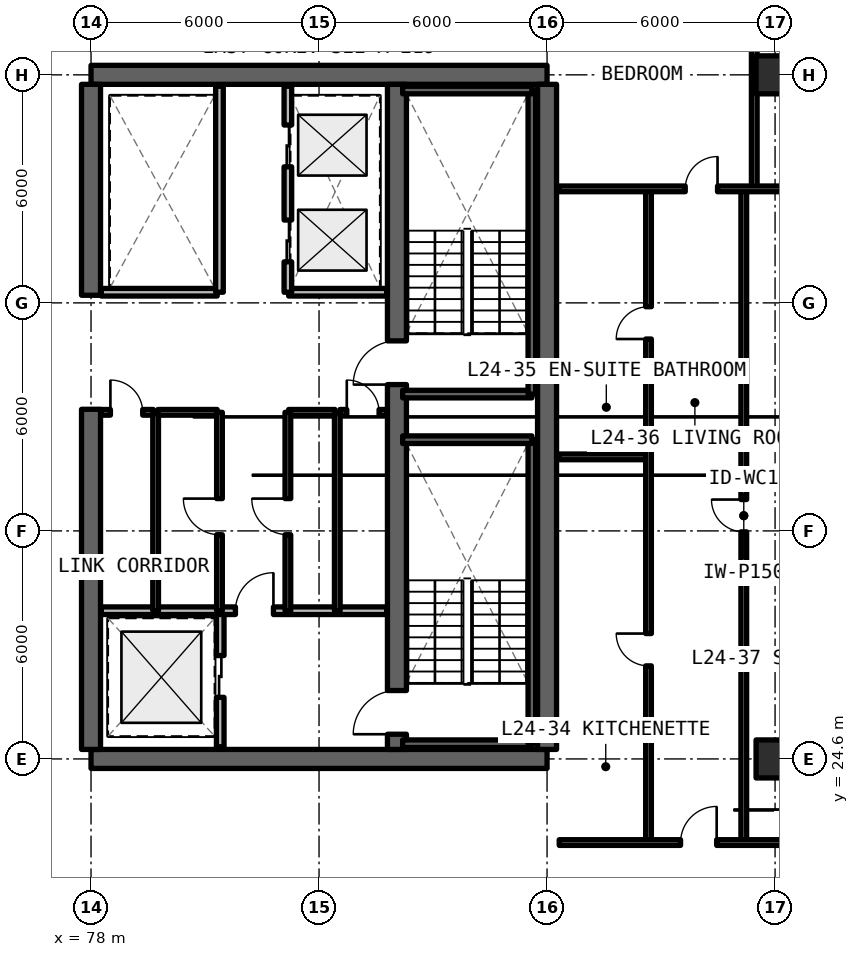
"""IFC4 building model, lengths in metres.
Left out: names, types, materials, properties, quantities, classifications, styles, units other than length and angle.
Written with IfcOpenShell. Run it as: python <this file> out.ifc"""

import sys

from ifc_helpers import new_model, si_unit, direction, frame, frame_2d, origin, origin_2d, place, context, subcontext, project, spatial, rectangle, extrude, element, fill, save


model = new_model("IFC4")
c1 = context("Model", 3, precision=1e-05, world=origin(), true_north=direction((0.0, 1.0)))
c2 = subcontext(c1, "Body", "Model", "MODEL_VIEW")
j1 = project(units=[si_unit("LENGTHUNIT", "METRE"), si_unit("PLANEANGLEUNIT", "RADIAN")], contexts=[c1])
p1 = place(None, origin())
s1 = spatial("IfcSite", under=j1, at=p1, CompositionType="ELEMENT")
p2 = place(p1, origin())
s2 = spatial("IfcBuilding", under=s1, at=p2, CompositionType="ELEMENT")
p3 = place(p2, frame((0.0, 0.0, 88.77)))
s3 = spatial("IfcBuildingStorey", under=s2, at=p3, CompositionType="ELEMENT", Elevation=88.77)
for number, where, z_axis, x_axis in (
    (1, (78.0, 24.6, 0.0), (0.0, 0.0, 1.0), (1.0, 0.0, 0.0)),
    (2, (90.0, 42.6, 0.0), (0.0, 0.0, 1.0), (-1.0, 0.0, 0.0)),
):
    element("IfcWall", number, at=place(p3, frame(where, z_axis=z_axis, x_axis=x_axis)), inside=s3, PredefinedType="SHEAR", context=c2, shape_type="SweptSolid", body=[
        extrude(rectangle(XDim=12.0, YDim=0.5, at=frame_2d((6.0, 0.0))), origin(), (0.0, 0.0, 1.0), 3.3),
    ])
p4 = place(p3, frame((90.0, 24.85, 0.0), z_axis=(0.0, 0.0, 1.0), x_axis=(0.0, 1.0, 0.0)))
e3 = element("IfcWall", 3, at=p4, inside=s3, PredefinedType="SHEAR", context=c2, shape_type="SweptSolid", body=[
    extrude(rectangle(XDim=17.5, YDim=0.5, at=frame_2d((8.75, 0.0))), origin(), (0.0, 0.0, 1.0), 3.3),
])
p5 = place(p3, frame((78.0, 24.85, 0.0), z_axis=(0.0, 0.0, 1.0), x_axis=(0.0, 1.0, 0.0)))
e4 = element("IfcWall", 4, at=p5, inside=s3, PredefinedType="SHEAR", context=c2, shape_type="SweptSolid", body=[
    extrude(rectangle(XDim=8.95, YDim=0.5, at=frame_2d((4.475, 0.0))), origin(), (0.0, 0.0, 1.0), 3.3),
])
p6 = place(p3, frame((78.0, 36.8, 0.0), z_axis=(0.0, 0.0, 1.0), x_axis=(0.0, 1.0, 0.0)))
e5 = element("IfcWall", 5, at=p6, inside=s3, PredefinedType="SHEAR", context=c2, shape_type="SweptSolid", body=[
    extrude(rectangle(XDim=5.55, YDim=0.5, at=frame_2d((2.775, 0.0))), origin(), (0.0, 0.0, 1.0), 3.3),
])
p7 = place(p3, frame((86.05, 24.85, 0.0), z_axis=(0.0, 0.0, 1.0), x_axis=(0.0, 1.0, 0.0)))
e6 = element("IfcWall", 6, at=p7, inside=s3, PredefinedType="SHEAR", context=c2, shape_type="SweptSolid", body=[
    extrude(rectangle(XDim=17.5, YDim=0.5, at=frame_2d((8.75, 0.0))), origin(), (0.0, 0.0, 1.0), 3.3),
])
p8 = place(p7, frame((0.4, 0.0, 0.0)))
e7 = element("IfcOpeningElement", 7, at=p8, cuts=e6, PredefinedType="OPENING", context=c2, shape_type="SweptSolid", body=[
    extrude(rectangle(XDim=1.15, YDim=2.15, at=frame_2d((0.575, 1.075))), frame((0.0, 0.26, 0.0), z_axis=(0.0, -1.0, 0.0), x_axis=(1.0, 0.0, 0.0)), (0.0, 0.0, 1.0), 0.52),
])
p9 = place(p7, frame((9.6, 0.0, 0.0)))
e8 = element("IfcOpeningElement", 8, at=p9, cuts=e6, PredefinedType="OPENING", context=c2, shape_type="SweptSolid", body=[
    extrude(rectangle(XDim=1.15, YDim=2.15, at=frame_2d((0.575, 1.075))), frame((0.0, 0.26, 0.0), z_axis=(0.0, -1.0, 0.0), x_axis=(1.0, 0.0, 0.0)), (0.0, 0.0, 1.0), 0.52),
])
for number, where, z_axis, x_axis in (
    (9, (96.0, 24.6, 0.0), (0.0, 0.0, 1.0), (1.0, 0.0, 0.0)),
    (10, (96.0, 42.6, 0.0), (0.0, 0.0, 1.0), (1.0, 0.0, 0.0)),
):
    element("IfcColumn", number, at=place(p3, frame(where, z_axis=z_axis, x_axis=x_axis)), inside=s3, PredefinedType="COLUMN", context=c2, shape_type="SweptSolid", body=[
        extrude(rectangle(XDim=1.0, YDim=1.0, at=origin_2d()), origin(), (0.0, 0.0, 1.0), 3.3),
    ])
p10 = place(p3, frame((81.4, 24.92, 0.0), z_axis=(0.0, 0.0, 1.0), x_axis=(0.0, 1.0, 0.0)))
e11 = element("IfcWall", 11, at=p10, inside=s3, PredefinedType="SOLIDWALL", context=c2, shape_type="SweptSolid", body=[
    extrude(rectangle(XDim=3.58, YDim=0.2, at=frame_2d((1.79, 0.0))), origin(), (0.0, 0.0, 1.0), 2.35),
])
p11 = place(p10, frame((1.3, 0.0, 0.0)))
e12 = element("IfcOpeningElement", 12, at=p11, cuts=e11, PredefinedType="OPENING", context=c2, shape_type="SweptSolid", body=[
    extrude(rectangle(XDim=1.1, YDim=2.2, at=frame_2d((0.55, 1.1))), frame((0.0, 0.11, 0.0), z_axis=(0.0, -1.0, 0.0), x_axis=(1.0, 0.0, 0.0)), (0.0, 0.0, 1.0), 0.22),
])
p12 = place(p3, frame((78.27, 28.5, 0.0), z_axis=(0.0, 0.0, 1.0), x_axis=(1.0, 0.0, 0.0)))
e13 = element("IfcWall", 13, at=p12, inside=s3, PredefinedType="SOLIDWALL", context=c2, shape_type="SweptSolid", body=[
    extrude(rectangle(XDim=7.51, YDim=0.2, at=frame_2d((3.755, 0.0))), origin(), (0.0, 0.0, 1.0), 2.35),
])
p13 = place(p12, frame((3.53, 0.0, 0.0)))
e14 = element("IfcOpeningElement", 14, at=p13, cuts=e13, PredefinedType="OPENING", context=c2, shape_type="SweptSolid", body=[
    extrude(rectangle(XDim=1.0, YDim=2.15, at=frame_2d((0.5, 1.075))), frame((0.0, 0.11, 0.0), z_axis=(0.0, -1.0, 0.0), x_axis=(1.0, 0.0, 0.0)), (0.0, 0.0, 1.0), 0.22),
])
p14 = place(p3, frame((84.48, 28.5, 0.0), z_axis=(0.0, 0.0, 1.0), x_axis=(0.0, 1.0, 0.0)))
e15 = element("IfcWall", 15, at=p14, inside=s3, PredefinedType="SOLIDWALL", context=c2, shape_type="SweptSolid", body=[
    extrude(rectangle(XDim=5.22, YDim=0.15, at=frame_2d((2.61, 0.0))), origin(), (0.0, 0.0, 1.0), 2.35),
])
p15 = place(p3, frame((84.55, 33.72, 0.0), z_axis=(0.0, 0.0, 1.0), x_axis=(1.0, 0.0, 0.0)))
e16 = element("IfcWall", 16, at=p15, inside=s3, PredefinedType="SOLIDWALL", context=c2, shape_type="SweptSolid", body=[
    extrude(rectangle(XDim=1.23, YDim=0.15, at=frame_2d((0.615, 0.0))), origin(), (0.0, 0.0, 1.0), 2.35),
])
p16 = place(p15, frame((0.18, 0.0, 0.0)))
e17 = element("IfcOpeningElement", 17, at=p16, cuts=e16, PredefinedType="OPENING", context=c2, shape_type="SweptSolid", body=[
    extrude(rectangle(XDim=0.85, YDim=2.1, at=frame_2d((0.425, 1.05))), frame((0.0, 0.085, 0.0), z_axis=(0.0, -1.0, 0.0), x_axis=(1.0, 0.0, 0.0)), (0.0, 0.0, 1.0), 0.17),
])
p17 = place(p3, frame((83.2, 33.72, 0.0), z_axis=(0.0, 0.0, 1.0), x_axis=(1.0, 0.0, 0.0)))
e18 = element("IfcWall", 18, at=p17, inside=s3, PredefinedType="SOLIDWALL", context=c2, shape_type="SweptSolid", body=[
    extrude(rectangle(XDim=1.22, YDim=0.15, at=frame_2d((0.61, 0.0))), origin(), (0.0, 0.0, 1.0), 2.35),
])
p18 = place(p3, frame((83.18, 28.5, 0.0), z_axis=(0.0, 0.0, 1.0), x_axis=(0.0, 1.0, 0.0)))
e19 = element("IfcWall", 19, at=p18, inside=s3, PredefinedType="SOLIDWALL", context=c2, shape_type="SweptSolid", body=[
    extrude(rectangle(XDim=5.22, YDim=0.15, at=frame_2d((2.61, 0.0))), origin(), (0.0, 0.0, 1.0), 2.35),
])
p19 = place(p18, frame((2.0, 0.0, 0.0)))
e20 = element("IfcOpeningElement", 20, at=p19, cuts=e19, PredefinedType="OPENING", context=c2, shape_type="SweptSolid", body=[
    extrude(rectangle(XDim=0.95, YDim=2.15, at=frame_2d((0.475, 1.075))), frame((0.0, 0.085, 0.0), z_axis=(0.0, -1.0, 0.0), x_axis=(1.0, 0.0, 0.0)), (0.0, 0.0, 1.0), 0.17),
])
p20 = place(p3, frame((79.7, 28.5, 0.0), z_axis=(0.0, 0.0, 1.0), x_axis=(0.0, 1.0, 0.0)))
e21 = element("IfcWall", 21, at=p20, inside=s3, PredefinedType="SOLIDWALL", context=c2, shape_type="SweptSolid", body=[
    extrude(rectangle(XDim=5.22, YDim=0.15, at=frame_2d((2.61, 0.0))), origin(), (0.0, 0.0, 1.0), 2.35),
])
p21 = place(p3, frame((79.76, 33.72, 0.0), z_axis=(0.0, 0.0, 1.0), x_axis=(1.0, 0.0, 0.0)))
e22 = element("IfcWall", 22, at=p21, inside=s3, PredefinedType="SOLIDWALL", context=c2, shape_type="SweptSolid", body=[
    extrude(rectangle(XDim=1.56, YDim=0.15, at=frame_2d((0.78, 0.0))), origin(), (0.0, 0.0, 1.0), 2.35),
])
p22 = place(p3, frame((78.27, 33.72, 0.0), z_axis=(0.0, 0.0, 1.0), x_axis=(1.0, 0.0, 0.0)))
e23 = element("IfcWall", 23, at=p22, inside=s3, PredefinedType="SOLIDWALL", context=c2, shape_type="SweptSolid", body=[
    extrude(rectangle(XDim=1.37, YDim=0.15, at=frame_2d((0.685, 0.0))), origin(), (0.0, 0.0, 1.0), 2.35),
])
p23 = place(p22, frame((0.24, 0.0, 0.0)))
e24 = element("IfcOpeningElement", 24, at=p23, cuts=e23, PredefinedType="OPENING", context=c2, shape_type="SweptSolid", body=[
    extrude(rectangle(XDim=0.85, YDim=2.1, at=frame_2d((0.425, 1.05))), frame((0.0, 0.085, 0.0), z_axis=(0.0, -1.0, 0.0), x_axis=(1.0, 0.0, 0.0)), (0.0, 0.0, 1.0), 0.17),
])
p24 = place(p3, frame((81.38, 28.5, 0.0), z_axis=(0.0, 0.0, 1.0), x_axis=(0.0, 1.0, 0.0)))
e25 = element("IfcWall", 25, at=p24, inside=s3, PredefinedType="SOLIDWALL", context=c2, shape_type="SweptSolid", body=[
    extrude(rectangle(XDim=5.22, YDim=0.15, at=frame_2d((2.61, 0.0))), origin(), (0.0, 0.0, 1.0), 2.35),
])
p25 = place(p24, frame((2.0, 0.0, 0.0)))
e26 = element("IfcOpeningElement", 26, at=p25, cuts=e25, PredefinedType="OPENING", context=c2, shape_type="SweptSolid", body=[
    extrude(rectangle(XDim=0.95, YDim=2.15, at=frame_2d((0.475, 1.075))), frame((0.0, 0.085, 0.0), z_axis=(0.0, -1.0, 0.0), x_axis=(1.0, 0.0, 0.0)), (0.0, 0.0, 1.0), 0.17),
])
p26 = place(p3, frame((83.2, 36.88, 0.0), z_axis=(0.0, 0.0, 1.0), x_axis=(1.0, 0.0, 0.0)))
e27 = element("IfcWall", 27, at=p26, inside=s3, PredefinedType="SOLIDWALL", context=c2, shape_type="SweptSolid", body=[
    extrude(rectangle(XDim=2.58, YDim=0.2, at=frame_2d((1.29, 0.0))), origin(), (0.0, 0.0, 1.0), 2.35),
])
p27 = place(p3, frame((83.18, 36.88, 0.0), z_axis=(0.0, 0.0, 1.0), x_axis=(0.0, 1.0, 0.0)))
e28 = element("IfcWall", 28, at=p27, inside=s3, PredefinedType="SOLIDWALL", context=c2, shape_type="SweptSolid", body=[
    extrude(rectangle(XDim=5.42, YDim=0.2, at=frame_2d((2.71, 0.0))), origin(), (0.0, 0.0, 1.0), 2.35),
])
p28 = place(p27, frame((0.8, 0.0, 0.0)))
e29 = element("IfcOpeningElement", 29, at=p28, cuts=e28, PredefinedType="OPENING", context=c2, shape_type="SweptSolid", body=[
    extrude(rectangle(XDim=1.1, YDim=2.2, at=frame_2d((0.55, 1.1))), frame((0.0, 0.11, 0.0), z_axis=(0.0, -1.0, 0.0), x_axis=(1.0, 0.0, 0.0)), (0.0, 0.0, 1.0), 0.22),
])
p29 = place(p27, frame((3.3, 0.0, 0.0)))
e30 = element("IfcOpeningElement", 30, at=p29, cuts=e28, PredefinedType="OPENING", context=c2, shape_type="SweptSolid", body=[
    extrude(rectangle(XDim=1.1, YDim=2.2, at=frame_2d((0.55, 1.1))), frame((0.0, 0.11, 0.0), z_axis=(0.0, -1.0, 0.0), x_axis=(1.0, 0.0, 0.0)), (0.0, 0.0, 1.0), 0.22),
])
p30 = place(p3, frame((78.27, 36.88, 0.0), z_axis=(0.0, 0.0, 1.0), x_axis=(1.0, 0.0, 0.0)))
e31 = element("IfcWall", 31, at=p30, inside=s3, PredefinedType="SOLIDWALL", context=c2, shape_type="SweptSolid", body=[
    extrude(rectangle(XDim=3.05, YDim=0.2, at=frame_2d((1.525, 0.0))), origin(), (0.0, 0.0, 1.0), 2.35),
])
p31 = place(p3, frame((81.38, 36.88, 0.0), z_axis=(0.0, 0.0, 1.0), x_axis=(0.0, 1.0, 0.0)))
e32 = element("IfcWall", 32, at=p31, inside=s3, PredefinedType="SOLIDWALL", context=c2, shape_type="SweptSolid", body=[
    extrude(rectangle(XDim=5.42, YDim=0.2, at=frame_2d((2.71, 0.0))), origin(), (0.0, 0.0, 1.0), 2.35),
])
p32 = place(p3, frame((95.177, 22.4, 0.0), z_axis=(0.0, 0.0, 1.0), x_axis=(0.0, 1.0, 0.0)))
e33 = element("IfcWall", 33, at=p32, inside=s3, PredefinedType="PARTITIONING", context=c2, shape_type="SweptSolid", body=[
    extrude(rectangle(XDim=17.2, YDim=0.15, at=frame_2d((8.6, 0.0))), origin(), (0.0, 0.0, 1.0), 2.35),
])
p33 = place(p32, frame((8.175, 0.0, 0.0)))
e34 = element("IfcOpeningElement", 34, at=p33, cuts=e33, PredefinedType="OPENING", context=c2, shape_type="SweptSolid", body=[
    extrude(rectangle(XDim=0.85, YDim=2.1, at=frame_2d((0.425, 1.05))), frame((0.0, 0.085, 0.0), z_axis=(0.0, -1.0, 0.0), x_axis=(1.0, 0.0, 0.0)), (0.0, 0.0, 1.0), 0.17),
])
p34 = place(p3, frame((90.32, 32.548, 0.0), z_axis=(0.0, 0.0, 1.0), x_axis=(1.0, 0.0, 0.0)))
e35 = element("IfcWall", 35, at=p34, inside=s3, PredefinedType="PARTITIONING", context=c2, shape_type="SweptSolid", body=[
    extrude(rectangle(XDim=2.35, YDim=0.15, at=frame_2d((1.175, 0.0))), origin(), (0.0, 0.0, 1.0), 2.35),
])
p35 = place(p3, frame((92.67, 22.4, 0.0), z_axis=(0.0, 0.0, 1.0), x_axis=(0.0, 1.0, 0.0)))
e36 = element("IfcWall", 36, at=p35, inside=s3, PredefinedType="PARTITIONING", context=c2, shape_type="SweptSolid", body=[
    extrude(rectangle(XDim=17.2, YDim=0.15, at=frame_2d((8.6, 0.0))), origin(), (0.0, 0.0, 1.0), 2.35),
])
p36 = place(p35, frame((4.649, 0.0, 0.0)))
e37 = element("IfcOpeningElement", 37, at=p36, cuts=e36, PredefinedType="OPENING", context=c2, shape_type="SweptSolid", body=[
    extrude(rectangle(XDim=0.85, YDim=2.1, at=frame_2d((0.425, 1.05))), frame((0.0, 0.085, 0.0), z_axis=(0.0, -1.0, 0.0), x_axis=(1.0, 0.0, 0.0)), (0.0, 0.0, 1.0), 0.17),
])
p37 = place(p35, frame((13.249, 0.0, 0.0)))
e38 = element("IfcOpeningElement", 38, at=p37, cuts=e36, PredefinedType="OPENING", context=c2, shape_type="SweptSolid", body=[
    extrude(rectangle(XDim=0.85, YDim=2.1, at=frame_2d((0.425, 1.05))), frame((0.0, 0.085, 0.0), z_axis=(0.0, -1.0, 0.0), x_axis=(1.0, 0.0, 0.0)), (0.0, 0.0, 1.0), 0.17),
])
p38 = place(p3, frame((95.452, 39.6, 0.0), z_axis=(0.0, 0.0, 1.0), x_axis=(0.0, 1.0, 0.0)))
e39 = element("IfcWall", 39, at=p38, inside=s3, PredefinedType="PARTITIONING", context=c2, shape_type="SweptSolid", body=[
    extrude(rectangle(XDim=5.2, YDim=0.15, at=frame_2d((2.6, 0.0))), origin(), (0.0, 0.0, 1.0), 2.35),
])
p39 = place(p3, frame((90.32, 39.6, 0.0), z_axis=(0.0, 0.0, 1.0), x_axis=(1.0, 0.0, 0.0)))
e40 = element("IfcWall", 40, at=p39, inside=s3, PredefinedType="PARTITIONING", context=c2, shape_type="SweptSolid", body=[
    extrude(rectangle(XDim=9.87, YDim=0.15, at=frame_2d((4.935, 0.0))), origin(), (0.0, 0.0, 1.0), 2.35),
])
p40 = place(p39, frame((3.316, 0.0, 0.0)))
e41 = element("IfcOpeningElement", 41, at=p40, cuts=e40, PredefinedType="OPENING", context=c2, shape_type="SweptSolid", body=[
    extrude(rectangle(XDim=0.85, YDim=2.1, at=frame_2d((0.425, 1.05))), frame((0.0, 0.085, 0.0), z_axis=(0.0, -1.0, 0.0), x_axis=(1.0, 0.0, 0.0)), (0.0, 0.0, 1.0), 0.17),
])
p41 = place(p39, frame((7.876, 0.0, 0.0)))
e42 = element("IfcOpeningElement", 42, at=p41, cuts=e40, PredefinedType="OPENING", context=c2, shape_type="SweptSolid", body=[
    extrude(rectangle(XDim=0.85, YDim=2.1, at=frame_2d((0.425, 1.05))), frame((0.0, 0.085, 0.0), z_axis=(0.0, -1.0, 0.0), x_axis=(1.0, 0.0, 0.0)), (0.0, 0.0, 1.0), 0.17),
])
p42 = place(p3, frame((90.32, 22.4, 0.0), z_axis=(0.0, 0.0, 1.0), x_axis=(1.0, 0.0, 0.0)))
e43 = element("IfcWall", 43, at=p42, inside=s3, PredefinedType="SOLIDWALL", context=c2, shape_type="SweptSolid", body=[
    extrude(rectangle(XDim=9.87, YDim=0.15, at=frame_2d((4.935, 0.0))), origin(), (0.0, 0.0, 1.0), 2.35),
])
p43 = place(p42, frame((3.193, 0.0, 0.0)))
e44 = element("IfcOpeningElement", 44, at=p43, cuts=e43, PredefinedType="OPENING", context=c2, shape_type="SweptSolid", body=[
    extrude(rectangle(XDim=0.95, YDim=2.15, at=frame_2d((0.475, 1.075))), frame((0.0, 0.085, 0.0), z_axis=(0.0, -1.0, 0.0), x_axis=(1.0, 0.0, 0.0)), (0.0, 0.0, 1.0), 0.17),
])
p44 = place(p3, frame((86.2, 25.0, 0.0), z_axis=(0.0, 0.0, 1.0), x_axis=(1.0, 0.0, 0.0)))
e45 = element("IfcWall", 45, at=p44, inside=s3, PredefinedType="SOLIDWALL", context=c2, shape_type="SweptSolid", body=[
    extrude(rectangle(XDim=3.4, YDim=0.2, at=frame_2d((1.7, 0.0))), origin(), (0.0, 0.0, 1.0), 3.3),
])
p45 = place(p3, frame((89.6, 25.0, 0.0), z_axis=(0.0, 0.0, 1.0), x_axis=(0.0, 1.0, 0.0)))
e46 = element("IfcWall", 46, at=p45, inside=s3, PredefinedType="SOLIDWALL", context=c2, shape_type="SweptSolid", body=[
    extrude(rectangle(XDim=8.0, YDim=0.2, at=frame_2d((4.0, 0.0))), origin(), (0.0, 0.0, 1.0), 3.3),
])
for number, where, z_axis, x_axis in (
    (47, (89.6, 33.0, 0.0), (0.0, 0.0, 1.0), (-1.0, 0.0, 0.0)),
    (48, (86.2, 34.2, 0.0), (0.0, 0.0, 1.0), (1.0, 0.0, 0.0)),
):
    element("IfcWall", number, at=place(p3, frame(where, z_axis=z_axis, x_axis=x_axis)), inside=s3, PredefinedType="SOLIDWALL", context=c2, shape_type="SweptSolid", body=[
        extrude(rectangle(XDim=3.4, YDim=0.2, at=frame_2d((1.7, 0.0))), origin(), (0.0, 0.0, 1.0), 3.3),
    ])
p46 = place(p3, frame((89.6, 34.2, 0.0), z_axis=(0.0, 0.0, 1.0), x_axis=(0.0, 1.0, 0.0)))
e49 = element("IfcWall", 49, at=p46, inside=s3, PredefinedType="SOLIDWALL", context=c2, shape_type="SweptSolid", body=[
    extrude(rectangle(XDim=8.0, YDim=0.2, at=frame_2d((4.0, 0.0))), origin(), (0.0, 0.0, 1.0), 3.3),
])
p47 = place(p3, frame((89.6, 42.2, 0.0), z_axis=(0.0, 0.0, 1.0), x_axis=(-1.0, 0.0, 0.0)))
e50 = element("IfcWall", 50, at=p47, inside=s3, PredefinedType="SOLIDWALL", context=c2, shape_type="SweptSolid", body=[
    extrude(rectangle(XDim=3.4, YDim=0.2, at=frame_2d((1.7, 0.0))), origin(), (0.0, 0.0, 1.0), 3.3),
])
p48 = place(p11, origin())
e51 = element("IfcDoor", 51, at=p48, inside=s3, OperationType="SLIDING_TO_LEFT", PredefinedType="DOOR", context=c2, shape_type="SweptSolid", body=[
    extrude(rectangle(XDim=1.1, YDim=2.2, at=frame_2d((0.55, 1.1))), frame((0.0, 0.025, 0.0), z_axis=(0.0, -1.0, 0.0), x_axis=(1.0, 0.0, 0.0)), (0.0, 0.0, 1.0), 0.05),
])
fill(e12, e51)
p49 = place(p13, origin())
e52 = element("IfcDoor", 52, at=p49, inside=s3, OperationType="SINGLE_SWING_RIGHT", PredefinedType="DOOR", context=c2, shape_type="SweptSolid", body=[
    extrude(rectangle(XDim=1.0, YDim=2.15, at=frame_2d((0.5, 1.075))), frame((0.0, 0.025, 0.0), z_axis=(0.0, -1.0, 0.0), x_axis=(1.0, 0.0, 0.0)), (0.0, 0.0, 1.0), 0.05),
])
fill(e14, e52)
p50 = place(p16, origin())
e53 = element("IfcDoor", 53, at=p50, inside=s3, OperationType="SINGLE_SWING_LEFT", PredefinedType="DOOR", context=c2, shape_type="SweptSolid", body=[
    extrude(rectangle(XDim=0.85, YDim=2.1, at=frame_2d((0.425, 1.05))), frame((0.0, 0.025, 0.0), z_axis=(0.0, -1.0, 0.0), x_axis=(1.0, 0.0, 0.0)), (0.0, 0.0, 1.0), 0.05),
])
fill(e17, e53)
p51 = place(p19, origin())
e54 = element("IfcDoor", 54, at=p51, inside=s3, OperationType="SINGLE_SWING_RIGHT", PredefinedType="DOOR", context=c2, shape_type="SweptSolid", body=[
    extrude(rectangle(XDim=0.95, YDim=2.15, at=frame_2d((0.475, 1.075))), frame((0.0, 0.025, 0.0), z_axis=(0.0, -1.0, 0.0), x_axis=(1.0, 0.0, 0.0)), (0.0, 0.0, 1.0), 0.05),
])
fill(e20, e54)
p52 = place(p23, origin())
e55 = element("IfcDoor", 55, at=p52, inside=s3, OperationType="SINGLE_SWING_LEFT", PredefinedType="DOOR", context=c2, shape_type="SweptSolid", body=[
    extrude(rectangle(XDim=0.85, YDim=2.1, at=frame_2d((0.425, 1.05))), frame((0.0, 0.025, 0.0), z_axis=(0.0, -1.0, 0.0), x_axis=(1.0, 0.0, 0.0)), (0.0, 0.0, 1.0), 0.05),
])
fill(e24, e55)
p53 = place(p25, origin())
e56 = element("IfcDoor", 56, at=p53, inside=s3, OperationType="SINGLE_SWING_RIGHT", PredefinedType="DOOR", context=c2, shape_type="SweptSolid", body=[
    extrude(rectangle(XDim=0.95, YDim=2.15, at=frame_2d((0.475, 1.075))), frame((0.0, 0.025, 0.0), z_axis=(0.0, -1.0, 0.0), x_axis=(1.0, 0.0, 0.0)), (0.0, 0.0, 1.0), 0.05),
])
fill(e26, e56)
p54 = place(p28, origin())
e57 = element("IfcDoor", 57, at=p54, inside=s3, OperationType="SLIDING_TO_LEFT", PredefinedType="DOOR", context=c2, shape_type="SweptSolid", body=[
    extrude(rectangle(XDim=1.1, YDim=2.2, at=frame_2d((0.55, 1.1))), frame((0.0, 0.025, 0.0), z_axis=(0.0, -1.0, 0.0), x_axis=(1.0, 0.0, 0.0)), (0.0, 0.0, 1.0), 0.05),
])
fill(e29, e57)
p55 = place(p29, origin())
e58 = element("IfcDoor", 58, at=p55, inside=s3, OperationType="SLIDING_TO_RIGHT", PredefinedType="DOOR", context=c2, shape_type="SweptSolid", body=[
    extrude(rectangle(XDim=1.1, YDim=2.2, at=frame_2d((0.55, 1.1))), frame((0.0, 0.025, 0.0), z_axis=(0.0, -1.0, 0.0), x_axis=(1.0, 0.0, 0.0)), (0.0, 0.0, 1.0), 0.05),
])
fill(e30, e58)
p56 = place(p33, origin())
e59 = element("IfcDoor", 59, at=p56, inside=s3, OperationType="SINGLE_SWING_RIGHT", PredefinedType="DOOR", context=c2, shape_type="SweptSolid", body=[
    extrude(rectangle(XDim=0.85, YDim=2.1, at=frame_2d((0.425, 1.05))), frame((0.0, 0.025, 0.0), z_axis=(0.0, -1.0, 0.0), x_axis=(1.0, 0.0, 0.0)), (0.0, 0.0, 1.0), 0.05),
])
fill(e34, e59)
p57 = place(p36, origin())
e60 = element("IfcDoor", 60, at=p57, inside=s3, OperationType="SINGLE_SWING_RIGHT", PredefinedType="DOOR", context=c2, shape_type="SweptSolid", body=[
    extrude(rectangle(XDim=0.85, YDim=2.1, at=frame_2d((0.425, 1.05))), frame((0.0, 0.025, 0.0), z_axis=(0.0, -1.0, 0.0), x_axis=(1.0, 0.0, 0.0)), (0.0, 0.0, 1.0), 0.05),
])
fill(e37, e60)
p58 = place(p37, origin())
e61 = element("IfcDoor", 61, at=p58, inside=s3, OperationType="SINGLE_SWING_LEFT", PredefinedType="DOOR", context=c2, shape_type="SweptSolid", body=[
    extrude(rectangle(XDim=0.85, YDim=2.1, at=frame_2d((0.425, 1.05))), frame((0.0, 0.025, 0.0), z_axis=(0.0, -1.0, 0.0), x_axis=(1.0, 0.0, 0.0)), (0.0, 0.0, 1.0), 0.05),
])
fill(e38, e61)
p59 = place(p40, origin())
e62 = element("IfcDoor", 62, at=p59, inside=s3, OperationType="SINGLE_SWING_RIGHT", PredefinedType="DOOR", context=c2, shape_type="SweptSolid", body=[
    extrude(rectangle(XDim=0.85, YDim=2.1, at=frame_2d((0.425, 1.05))), frame((0.0, 0.025, 0.0), z_axis=(0.0, -1.0, 0.0), x_axis=(1.0, 0.0, 0.0)), (0.0, 0.0, 1.0), 0.05),
])
fill(e41, e62)
p60 = place(p43, origin())
e63 = element("IfcDoor", 63, at=p60, inside=s3, OperationType="SINGLE_SWING_RIGHT", PredefinedType="DOOR", context=c2, shape_type="SweptSolid", body=[
    extrude(rectangle(XDim=0.95, YDim=2.15, at=frame_2d((0.475, 1.075))), frame((0.0, 0.025, 0.0), z_axis=(0.0, -1.0, 0.0), x_axis=(1.0, 0.0, 0.0)), (0.0, 0.0, 1.0), 0.05),
])
fill(e44, e63)
p61 = place(p8, origin())
e64 = element("IfcDoor", 64, at=p61, inside=s3, OperationType="SINGLE_SWING_LEFT", PredefinedType="DOOR", context=c2, shape_type="SweptSolid", body=[
    extrude(rectangle(XDim=1.15, YDim=2.15, at=frame_2d((0.575, 1.075))), frame((0.0, 0.025, 0.0), z_axis=(0.0, -1.0, 0.0), x_axis=(1.0, 0.0, 0.0)), (0.0, 0.0, 1.0), 0.05),
])
fill(e7, e64)
p62 = place(p9, origin())
e65 = element("IfcDoor", 65, at=p62, inside=s3, OperationType="SINGLE_SWING_RIGHT", PredefinedType="DOOR", context=c2, shape_type="SweptSolid", body=[
    extrude(rectangle(XDim=1.15, YDim=2.15, at=frame_2d((0.575, 1.075))), frame((0.0, 0.025, 0.0), z_axis=(0.0, -1.0, 0.0), x_axis=(1.0, 0.0, 0.0)), (0.0, 0.0, 1.0), 0.05),
])
fill(e8, e65)
save(model, sys.argv[1])
